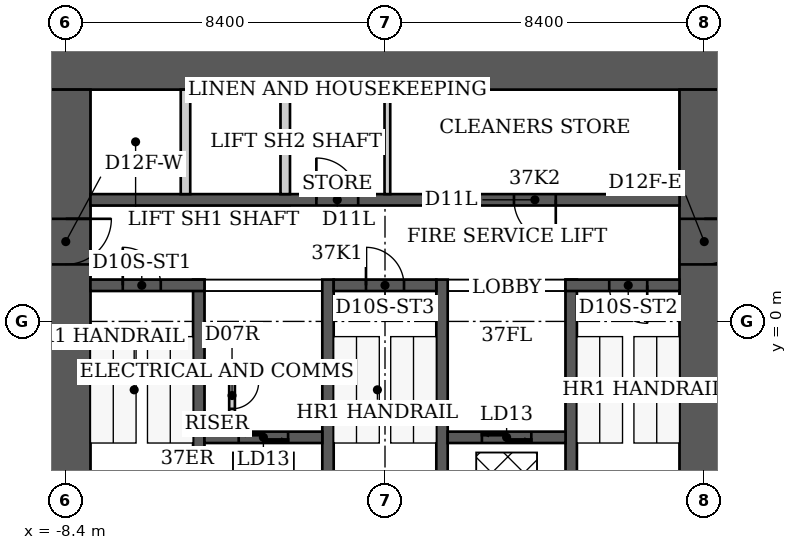
"""IFC4 building model, lengths in metres.
Left out: names, types, materials, properties, quantities, classifications, styles, units other than length and angle.
Written with IfcOpenShell. Run it as: python <this file> out.ifc"""

import sys

from ifc_helpers import new_model, si_unit, direction, frame, frame_2d, origin, place, context, subcontext, project, spatial, rectangle, extrude, element, fill, save


model = new_model("IFC4")
c1 = context("Model", 3, precision=1e-05, world=origin(), true_north=direction((0.0, 1.0)))
c2 = subcontext(c1, "Body", "Model", "MODEL_VIEW")
j1 = project(units=[si_unit("LENGTHUNIT", "METRE"), si_unit("PLANEANGLEUNIT", "RADIAN")], contexts=[c1])
p1 = place(None, origin())
s1 = spatial("IfcSite", under=j1, at=p1, CompositionType="ELEMENT")
p2 = place(p1, origin())
s2 = spatial("IfcBuilding", under=s1, at=p2, CompositionType="ELEMENT")
p3 = place(p2, frame((0.0, 0.0, 150.0)))
s3 = spatial("IfcBuildingStorey", under=s2, at=p3, CompositionType="ELEMENT", Elevation=150.0)
p4 = place(p3, frame((-9.05, 6.75, 0.0), z_axis=(0.0, 0.0, 1.0), x_axis=(1.0, 0.0, 0.0)))
e1 = element("IfcWall", 1, at=p4, inside=s3, PredefinedType="SHEAR", context=c2, shape_type="SweptSolid", body=[
    extrude(rectangle(XDim=18.1, YDim=1.3, at=frame_2d((9.05, 0.0))), origin(), (0.0, 0.0, 1.0), 3.8),
])
p5 = place(p3, frame((-8.4, -9.2, 0.0), z_axis=(0.0, 0.0, 1.0), x_axis=(0.0, 1.0, 0.0)))
e2 = element("IfcWall", 2, at=p5, inside=s3, PredefinedType="SHEAR", context=c2, shape_type="SweptSolid", body=[
    extrude(rectangle(XDim=15.3, YDim=1.3, at=frame_2d((7.65, 0.0))), origin(), (0.0, 0.0, 1.0), 3.8),
])
p6 = place(p5, frame((10.7, 0.0, 0.0)))
e3 = element("IfcOpeningElement", 3, at=p6, cuts=e2, PredefinedType="OPENING", context=c2, shape_type="SweptSolid", body=[
    extrude(rectangle(XDim=1.2, YDim=2.2, at=frame_2d((0.6, 1.1))), frame((0.0, 0.65, 0.0), z_axis=(0.0, -1.0, 0.0), x_axis=(1.0, 0.0, 0.0)), (0.0, 0.0, 1.0), 1.3),
])
p7 = place(p3, frame((8.4, -9.2, 0.0), z_axis=(0.0, 0.0, 1.0), x_axis=(0.0, 1.0, 0.0)))
e4 = element("IfcWall", 4, at=p7, inside=s3, PredefinedType="SHEAR", context=c2, shape_type="SweptSolid", body=[
    extrude(rectangle(XDim=15.3, YDim=1.3, at=frame_2d((7.65, 0.0))), origin(), (0.0, 0.0, 1.0), 3.8),
])
p8 = place(p7, frame((10.7, 0.0, 0.0)))
e5 = element("IfcOpeningElement", 5, at=p8, cuts=e4, PredefinedType="OPENING", context=c2, shape_type="SweptSolid", body=[
    extrude(rectangle(XDim=1.2, YDim=2.2, at=frame_2d((0.6, 1.1))), frame((0.0, 0.65, 0.0), z_axis=(0.0, -1.0, 0.0), x_axis=(1.0, 0.0, 0.0)), (0.0, 0.0, 1.0), 1.3),
])
for number, where, z_axis, x_axis in (
    (6, (-4.9, -6.1, 0.0), (0.0, 0.0, 1.0), (0.0, 1.0, 0.0)),
    (7, (-1.5, -6.1, 0.0), (0.0, 0.0, 1.0), (0.0, 1.0, 0.0)),
    (8, (1.5, -6.1, 0.0), (0.0, 0.0, 1.0), (0.0, 1.0, 0.0)),
    (9, (4.9, -6.1, 0.0), (0.0, 0.0, 1.0), (0.0, 1.0, 0.0)),
):
    element("IfcWall", number, at=place(p3, frame(where, z_axis=z_axis, x_axis=x_axis)), inside=s3, PredefinedType="SHEAR", context=c2, shape_type="SweptSolid", body=[
        extrude(rectangle(XDim=7.2, YDim=0.3, at=frame_2d((3.6, 0.0))), origin(), (0.0, 0.0, 1.0), 3.8),
    ])
p9 = place(p3, frame((-7.75, 0.95, 0.0), z_axis=(0.0, 0.0, 1.0), x_axis=(1.0, 0.0, 0.0)))
e10 = element("IfcWall", 10, at=p9, inside=s3, PredefinedType="SHEAR", context=c2, shape_type="SweptSolid", body=[
    extrude(rectangle(XDim=3.0, YDim=0.3, at=frame_2d((1.5, 0.0))), origin(), (0.0, 0.0, 1.0), 3.8),
])
p10 = place(p9, frame((0.85, 0.0, 0.0)))
e11 = element("IfcOpeningElement", 11, at=p10, cuts=e10, PredefinedType="OPENING", context=c2, shape_type="SweptSolid", body=[
    extrude(rectangle(XDim=1.0, YDim=2.2, at=frame_2d((0.5, 1.1))), frame((0.0, 0.15, 0.0), z_axis=(0.0, -1.0, 0.0), x_axis=(1.0, 0.0, 0.0)), (0.0, 0.0, 1.0), 0.3),
])
p11 = place(p3, frame((-1.35, 0.95, 0.0), z_axis=(0.0, 0.0, 1.0), x_axis=(1.0, 0.0, 0.0)))
e12 = element("IfcWall", 12, at=p11, inside=s3, PredefinedType="SHEAR", context=c2, shape_type="SweptSolid", body=[
    extrude(rectangle(XDim=2.7, YDim=0.3, at=frame_2d((1.35, 0.0))), origin(), (0.0, 0.0, 1.0), 3.8),
])
p12 = place(p11, frame((0.85, 0.0, 0.0)))
e13 = element("IfcOpeningElement", 13, at=p12, cuts=e12, PredefinedType="OPENING", context=c2, shape_type="SweptSolid", body=[
    extrude(rectangle(XDim=1.0, YDim=2.2, at=frame_2d((0.5, 1.1))), frame((0.0, 0.15, 0.0), z_axis=(0.0, -1.0, 0.0), x_axis=(1.0, 0.0, 0.0)), (0.0, 0.0, 1.0), 0.3),
])
p13 = place(p3, frame((4.75, 0.95, 0.0), z_axis=(0.0, 0.0, 1.0), x_axis=(1.0, 0.0, 0.0)))
e14 = element("IfcWall", 14, at=p13, inside=s3, PredefinedType="SHEAR", context=c2, shape_type="SweptSolid", body=[
    extrude(rectangle(XDim=3.0, YDim=0.3, at=frame_2d((1.5, 0.0))), origin(), (0.0, 0.0, 1.0), 3.8),
])
p14 = place(p13, frame((1.15, 0.0, 0.0)))
e15 = element("IfcOpeningElement", 15, at=p14, cuts=e14, PredefinedType="OPENING", context=c2, shape_type="SweptSolid", body=[
    extrude(rectangle(XDim=1.0, YDim=2.2, at=frame_2d((0.5, 1.1))), frame((0.0, 0.15, 0.0), z_axis=(0.0, -1.0, 0.0), x_axis=(1.0, 0.0, 0.0)), (0.0, 0.0, 1.0), 0.3),
])
p15 = place(p3, frame((-4.75, -3.05, 0.0), z_axis=(0.0, 0.0, 1.0), x_axis=(1.0, 0.0, 0.0)))
e16 = element("IfcWall", 16, at=p15, inside=s3, PredefinedType="SHEAR", context=c2, shape_type="SweptSolid", body=[
    extrude(rectangle(XDim=3.1, YDim=0.3, at=frame_2d((1.55, 0.0))), origin(), (0.0, 0.0, 1.0), 3.8),
])
p16 = place(p15, frame((0.9, 0.0, 0.0)))
e17 = element("IfcOpeningElement", 17, at=p16, cuts=e16, PredefinedType="OPENING", context=c2, shape_type="SweptSolid", body=[
    extrude(rectangle(XDim=1.3, YDim=2.1, at=frame_2d((0.65, 1.05))), frame((0.0, 0.15, 0.0), z_axis=(0.0, -1.0, 0.0), x_axis=(1.0, 0.0, 0.0)), (0.0, 0.0, 1.0), 0.3),
])
p17 = place(p3, frame((1.65, -3.05, 0.0), z_axis=(0.0, 0.0, 1.0), x_axis=(1.0, 0.0, 0.0)))
e18 = element("IfcWall", 18, at=p17, inside=s3, PredefinedType="SHEAR", context=c2, shape_type="SweptSolid", body=[
    extrude(rectangle(XDim=3.1, YDim=0.3, at=frame_2d((1.55, 0.0))), origin(), (0.0, 0.0, 1.0), 3.8),
])
p18 = place(p17, frame((0.9, 0.0, 0.0)))
e19 = element("IfcOpeningElement", 19, at=p18, cuts=e18, PredefinedType="OPENING", context=c2, shape_type="SweptSolid", body=[
    extrude(rectangle(XDim=1.3, YDim=2.1, at=frame_2d((0.65, 1.05))), frame((0.0, 0.15, 0.0), z_axis=(0.0, -1.0, 0.0), x_axis=(1.0, 0.0, 0.0)), (0.0, 0.0, 1.0), 0.3),
])
p19 = place(p3, frame((-7.75, 3.2, 0.0), z_axis=(0.0, 0.0, 1.0), x_axis=(1.0, 0.0, 0.0)))
e20 = element("IfcWall", 20, at=p19, inside=s3, PredefinedType="SHEAR", context=c2, shape_type="SweptSolid", body=[
    extrude(rectangle(XDim=15.5, YDim=0.3, at=frame_2d((7.75, 0.0))), origin(), (0.0, 0.0, 1.0), 3.8),
])
p20 = place(p19, frame((5.944, 0.0, 0.0)))
e21 = element("IfcOpeningElement", 21, at=p20, cuts=e20, PredefinedType="OPENING", context=c2, shape_type="SweptSolid", body=[
    extrude(rectangle(XDim=1.1, YDim=2.2, at=frame_2d((0.55, 1.1))), frame((0.0, 0.15, 0.0), z_axis=(0.0, -1.0, 0.0), x_axis=(1.0, 0.0, 0.0)), (0.0, 0.0, 1.0), 0.3),
])
p21 = place(p19, frame((11.144, 0.0, 0.0)))
e22 = element("IfcOpeningElement", 22, at=p21, cuts=e20, PredefinedType="OPENING", context=c2, shape_type="SweptSolid", body=[
    extrude(rectangle(XDim=1.1, YDim=2.2, at=frame_2d((0.55, 1.1))), frame((0.0, 0.15, 0.0), z_axis=(0.0, -1.0, 0.0), x_axis=(1.0, 0.0, 0.0)), (0.0, 0.0, 1.0), 0.3),
])
for number, where, z_axis, x_axis in (
    (23, (-5.25, 3.35, 0.0), (0.0, 0.0, 1.0), (0.0, 1.0, 0.0)),
    (24, (-2.625, 3.35, 0.0), (0.0, 0.0, 1.0), (0.0, 1.0, 0.0)),
):
    element("IfcWall", number, at=place(p3, frame(where, z_axis=z_axis, x_axis=x_axis)), inside=s3, PredefinedType="PARTITIONING", context=c2, shape_type="SweptSolid", body=[
        extrude(rectangle(XDim=2.75, YDim=0.25, at=frame_2d((1.375, 0.0))), origin(), (0.0, 0.0, 1.0), 3.8),
    ])
p22 = place(p3, frame((-4.025, -2.9, 0.0), z_axis=(0.0, 0.0, 1.0), x_axis=(0.0, 1.0, 0.0)))
e25 = element("IfcWall", 25, at=p22, inside=s3, PredefinedType="PARTITIONING", context=c2, shape_type="SweptSolid", body=[
    extrude(rectangle(XDim=1.775, YDim=0.15, at=frame_2d((0.887, 0.0))), origin(), (0.0, 0.0, 1.0), 3.64),
])
p23 = place(p22, frame((0.6, 0.0, 0.0)))
e26 = element("IfcOpeningElement", 26, at=p23, cuts=e25, PredefinedType="OPENING", context=c2, shape_type="SweptSolid", body=[
    extrude(rectangle(XDim=0.7, YDim=2.1, at=frame_2d((0.35, 1.05))), frame((0.0, 0.075, 0.0), z_axis=(0.0, -1.0, 0.0), x_axis=(1.0, 0.0, 0.0)), (0.0, 0.0, 1.0), 0.15),
])
p24 = place(p3, frame((-4.75, -1.2, 0.0), z_axis=(0.0, 0.0, 1.0), x_axis=(1.0, 0.0, 0.0)))
e27 = element("IfcWall", 27, at=p24, inside=s3, PredefinedType="PARTITIONING", context=c2, shape_type="SweptSolid", body=[
    extrude(rectangle(XDim=0.8, YDim=0.15, at=frame_2d((0.4, 0.0))), origin(), (0.0, 0.0, 1.0), 3.64),
])
p25 = place(p3, frame((0.062, 3.35, 0.0), z_axis=(0.0, 0.0, 1.0), x_axis=(0.0, 1.0, 0.0)))
e28 = element("IfcWall", 28, at=p25, inside=s3, PredefinedType="PARTITIONING", context=c2, shape_type="SweptSolid", body=[
    extrude(rectangle(XDim=2.75, YDim=0.15, at=frame_2d((1.375, 0.0))), origin(), (0.0, 0.0, 1.0), 3.64),
])
p26 = place(p10, origin())
e29 = element("IfcDoor", 29, at=p26, inside=s3, OperationType="SINGLE_SWING_LEFT", PredefinedType="DOOR", context=c2, shape_type="SweptSolid", body=[
    extrude(rectangle(XDim=1.0, YDim=2.2, at=frame_2d((0.5, 1.1))), frame((0.0, 0.025, 0.0), z_axis=(0.0, -1.0, 0.0), x_axis=(1.0, 0.0, 0.0)), (0.0, 0.0, 1.0), 0.05),
])
fill(e11, e29)
p27 = place(p12, origin())
e30 = element("IfcDoor", 30, at=p27, inside=s3, OperationType="SINGLE_SWING_LEFT", PredefinedType="DOOR", context=c2, shape_type="SweptSolid", body=[
    extrude(rectangle(XDim=1.0, YDim=2.2, at=frame_2d((0.5, 1.1))), frame((0.0, 0.025, 0.0), z_axis=(0.0, -1.0, 0.0), x_axis=(1.0, 0.0, 0.0)), (0.0, 0.0, 1.0), 0.05),
])
fill(e13, e30)
p28 = place(p14, origin())
e31 = element("IfcDoor", 31, at=p28, inside=s3, OperationType="SINGLE_SWING_RIGHT", PredefinedType="DOOR", context=c2, shape_type="SweptSolid", body=[
    extrude(rectangle(XDim=1.0, YDim=2.2, at=frame_2d((0.5, 1.1))), frame((0.0, 0.025, 0.0), z_axis=(0.0, -1.0, 0.0), x_axis=(1.0, 0.0, 0.0)), (0.0, 0.0, 1.0), 0.05),
])
fill(e15, e31)
p29 = place(p6, origin())
e32 = element("IfcDoor", 32, at=p29, inside=s3, OperationType="SINGLE_SWING_RIGHT", PredefinedType="DOOR", context=c2, shape_type="SweptSolid", body=[
    extrude(rectangle(XDim=1.2, YDim=2.2, at=frame_2d((0.6, 1.1))), frame((0.0, 0.025, 0.0), z_axis=(0.0, -1.0, 0.0), x_axis=(1.0, 0.0, 0.0)), (0.0, 0.0, 1.0), 0.05),
])
fill(e3, e32)
p30 = place(p8, origin())
e33 = element("IfcDoor", 33, at=p30, inside=s3, OperationType="SINGLE_SWING_RIGHT", PredefinedType="DOOR", context=c2, shape_type="SweptSolid", body=[
    extrude(rectangle(XDim=1.2, YDim=2.2, at=frame_2d((0.6, 1.1))), frame((0.0, 0.025, 0.0), z_axis=(0.0, -1.0, 0.0), x_axis=(1.0, 0.0, 0.0)), (0.0, 0.0, 1.0), 0.05),
])
fill(e5, e33)
p31 = place(p23, origin())
e34 = element("IfcDoor", 34, at=p31, inside=s3, OperationType="SINGLE_SWING_RIGHT", PredefinedType="DOOR", context=c2, shape_type="SweptSolid", body=[
    extrude(rectangle(XDim=0.7, YDim=2.1, at=frame_2d((0.35, 1.05))), frame((0.0, 0.025, 0.0), z_axis=(0.0, -1.0, 0.0), x_axis=(1.0, 0.0, 0.0)), (0.0, 0.0, 1.0), 0.05),
])
fill(e26, e34)
p32 = place(p20, origin())
e35 = element("IfcDoor", 35, at=p32, inside=s3, OperationType="SINGLE_SWING_LEFT", PredefinedType="DOOR", context=c2, shape_type="SweptSolid", body=[
    extrude(rectangle(XDim=1.1, YDim=2.2, at=frame_2d((0.55, 1.1))), frame((0.0, 0.025, 0.0), z_axis=(0.0, -1.0, 0.0), x_axis=(1.0, 0.0, 0.0)), (0.0, 0.0, 1.0), 0.05),
])
fill(e21, e35)
p33 = place(p21, origin())
e36 = element("IfcDoor", 36, at=p33, inside=s3, OperationType="SINGLE_SWING_RIGHT", PredefinedType="DOOR", context=c2, shape_type="SweptSolid", body=[
    extrude(rectangle(XDim=1.1, YDim=2.2, at=frame_2d((0.55, 1.1))), frame((0.0, 0.025, 0.0), z_axis=(0.0, -1.0, 0.0), x_axis=(1.0, 0.0, 0.0)), (0.0, 0.0, 1.0), 0.05),
])
fill(e22, e36)
p34 = place(p16, origin())
e37 = element("IfcDoor", 37, at=p34, inside=s3, OperationType="DOUBLE_DOOR_SLIDING", PredefinedType="DOOR", context=c2, shape_type="SweptSolid", body=[
    extrude(rectangle(XDim=1.3, YDim=2.1, at=frame_2d((0.65, 1.05))), frame((0.0, 0.025, 0.0), z_axis=(0.0, -1.0, 0.0), x_axis=(1.0, 0.0, 0.0)), (0.0, 0.0, 1.0), 0.05),
])
fill(e17, e37)
p35 = place(p18, origin())
e38 = element("IfcDoor", 38, at=p35, inside=s3, OperationType="DOUBLE_DOOR_SLIDING", PredefinedType="DOOR", context=c2, shape_type="SweptSolid", body=[
    extrude(rectangle(XDim=1.3, YDim=2.1, at=frame_2d((0.65, 1.05))), frame((0.0, 0.025, 0.0), z_axis=(0.0, -1.0, 0.0), x_axis=(1.0, 0.0, 0.0)), (0.0, 0.0, 1.0), 0.05),
])
fill(e19, e38)
save(model, sys.argv[1])
